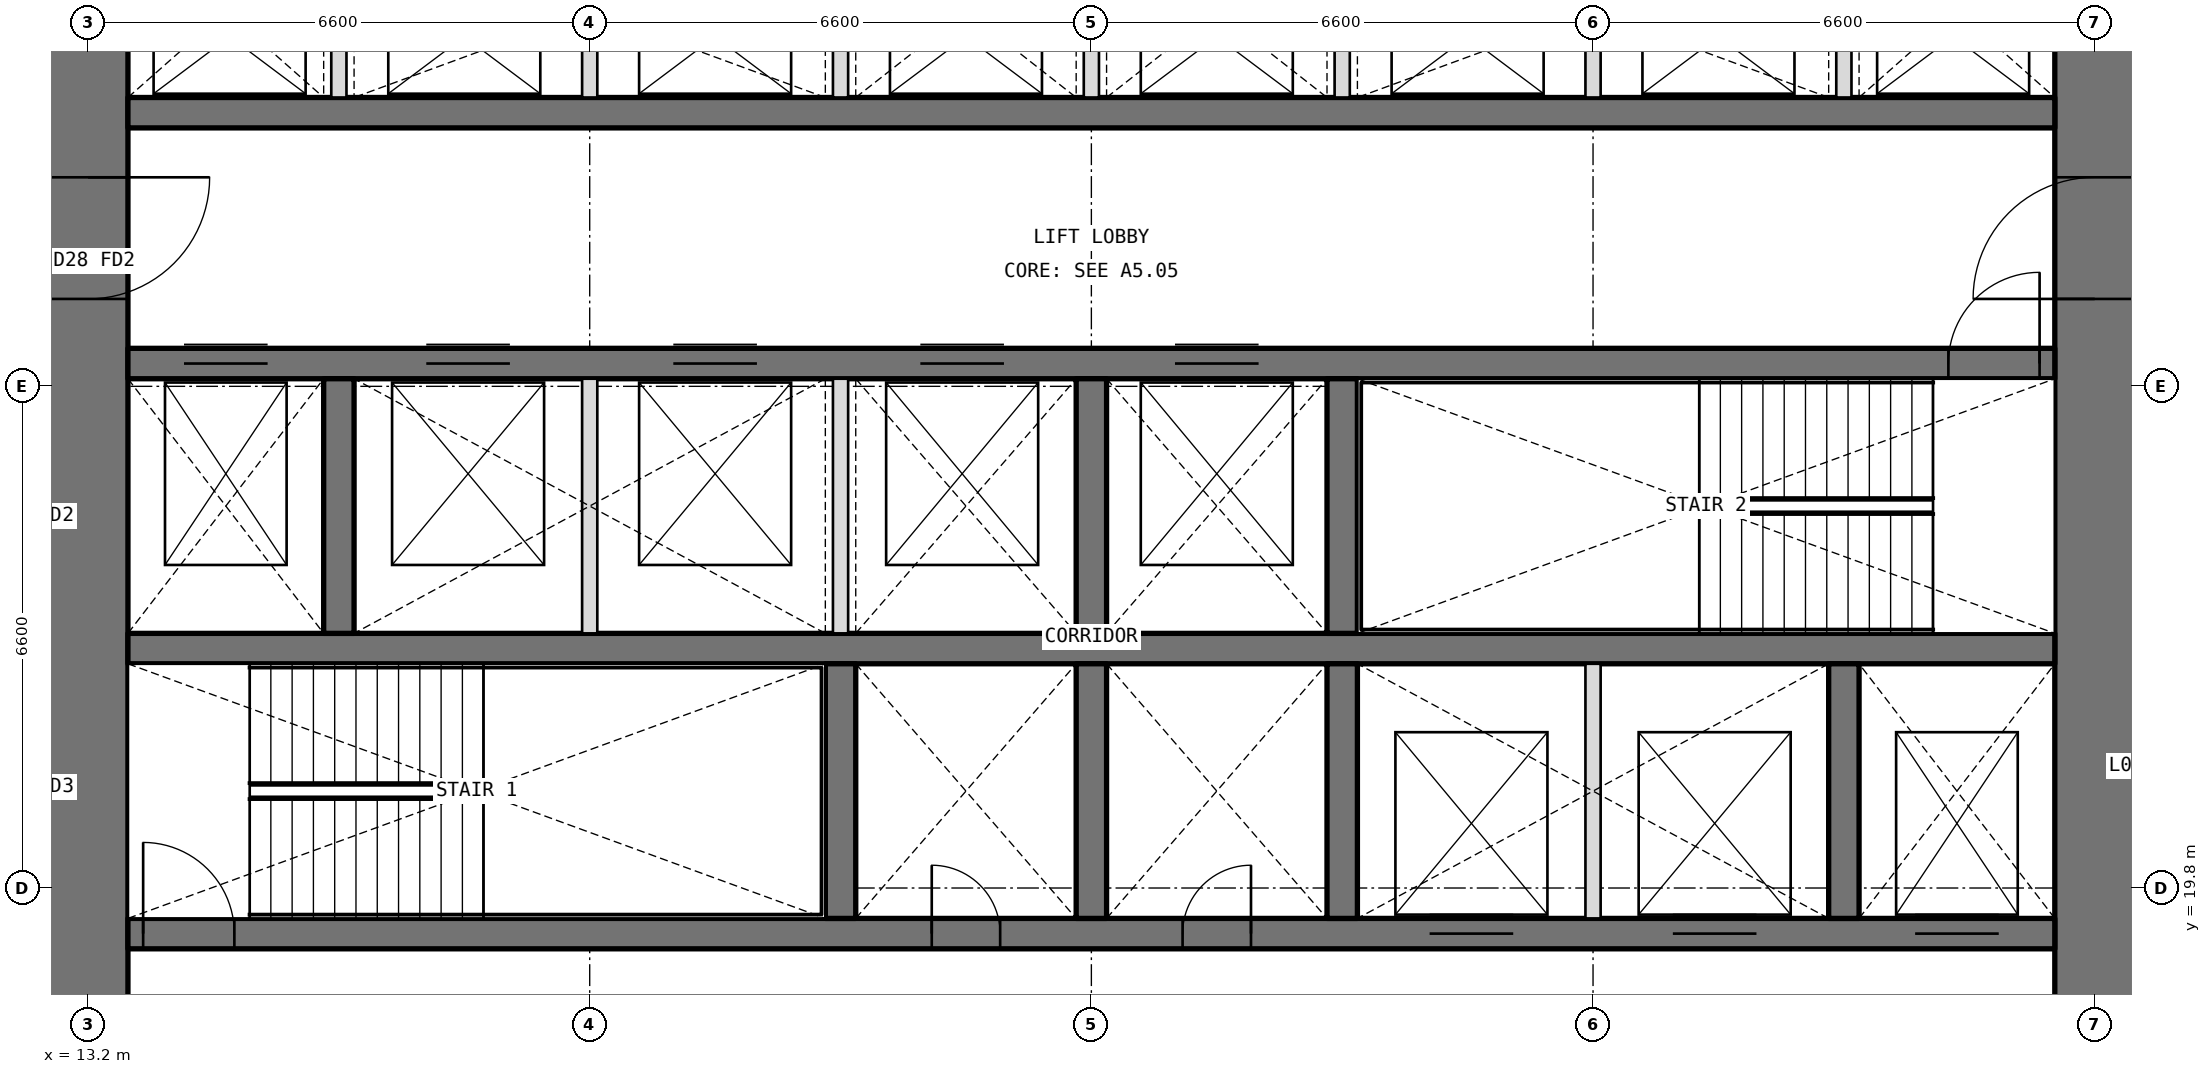
"""IFC4 building model, lengths in metres.
Left out: names, types, materials, properties, quantities, classifications, styles, units other than length and angle.
Written with IfcOpenShell. Run it as: python <this file> out.ifc"""

import sys

from ifc_helpers import new_model, si_unit, direction, frame, frame_2d, origin, place, context, subcontext, project, spatial, rectangle, extrude, element, fill, save


model = new_model("IFC4")
c1 = context("Model", 3, precision=1e-05, world=origin(), true_north=direction((0.0, 1.0)))
c2 = subcontext(c1, "Body", "Model", "MODEL_VIEW")
j1 = project(units=[si_unit("LENGTHUNIT", "METRE"), si_unit("PLANEANGLEUNIT", "RADIAN")], contexts=[c1])
p1 = place(None, origin())
s1 = spatial("IfcSite", under=j1, at=p1, CompositionType="ELEMENT")
p2 = place(p1, origin())
s2 = spatial("IfcBuilding", under=s1, at=p2, CompositionType="ELEMENT")
p3 = place(p2, frame((0.0, 0.0, 17.1)))
s3 = spatial("IfcBuildingStorey", under=s2, at=p3, CompositionType="ELEMENT", Elevation=17.1)
p4 = place(p3, frame((39.6, 13.725, 0.0), z_axis=(0.0, 0.0, 1.0), x_axis=(0.0, 1.0, 0.0)))
e1 = element("IfcWall", 1, at=p4, inside=s3, PredefinedType="SHEAR", context=c2, shape_type="SweptSolid", body=[
    extrude(rectangle(XDim=18.75, YDim=1.05, at=frame_2d((9.375, 0.0))), origin(), (0.0, 0.0, 1.0), 4.2),
])
p5 = place(p4, frame((3.025, 0.0, 0.0)))
e2 = element("IfcOpeningElement", 2, at=p5, cuts=e1, PredefinedType="OPENING", context=c2, shape_type="SweptSolid", body=[
    extrude(rectangle(XDim=1.6, YDim=2.1, at=frame_2d((0.8, 1.05))), frame((0.0, 0.535, 0.0), z_axis=(0.0, -1.0, 0.0), x_axis=(1.0, 0.0, 0.0)), (0.0, 0.0, 1.0), 1.07),
])
p6 = place(p4, frame((13.825, 0.0, 0.0)))
e3 = element("IfcOpeningElement", 3, at=p6, cuts=e1, PredefinedType="OPENING", context=c2, shape_type="SweptSolid", body=[
    extrude(rectangle(XDim=1.6, YDim=2.1, at=frame_2d((0.8, 1.05))), frame((0.0, 0.535, 0.0), z_axis=(0.0, -1.0, 0.0), x_axis=(1.0, 0.0, 0.0)), (0.0, 0.0, 1.0), 1.07),
])
p7 = place(p3, frame((13.2, 32.475, 0.0), z_axis=(0.0, 0.0, 1.0), x_axis=(0.0, -1.0, 0.0)))
e4 = element("IfcWall", 4, at=p7, inside=s3, PredefinedType="SHEAR", context=c2, shape_type="SweptSolid", body=[
    extrude(rectangle(XDim=18.75, YDim=1.05, at=frame_2d((9.375, 0.0))), origin(), (0.0, 0.0, 1.0), 4.2),
])
p8 = place(p7, frame((14.125, 0.0, 0.0)))
e5 = element("IfcOpeningElement", 5, at=p8, cuts=e4, PredefinedType="OPENING", context=c2, shape_type="SweptSolid", body=[
    extrude(rectangle(XDim=1.6, YDim=2.1, at=frame_2d((0.8, 1.05))), frame((0.0, 0.535, 0.0), z_axis=(0.0, -1.0, 0.0), x_axis=(1.0, 0.0, 0.0)), (0.0, 0.0, 1.0), 1.07),
])
p9 = place(p7, frame((3.325, 0.0, 0.0)))
e6 = element("IfcOpeningElement", 6, at=p9, cuts=e4, PredefinedType="OPENING", context=c2, shape_type="SweptSolid", body=[
    extrude(rectangle(XDim=1.6, YDim=2.1, at=frame_2d((0.8, 1.05))), frame((0.0, 0.535, 0.0), z_axis=(0.0, -1.0, 0.0), x_axis=(1.0, 0.0, 0.0)), (0.0, 0.0, 1.0), 1.07),
])
p10 = place(p3, frame((13.725, 19.2, 0.0), z_axis=(0.0, 0.0, 1.0), x_axis=(1.0, 0.0, 0.0)))
e7 = element("IfcWall", 7, at=p10, inside=s3, PredefinedType="SHEAR", context=c2, shape_type="SweptSolid", body=[
    extrude(rectangle(XDim=25.35, YDim=0.4, at=frame_2d((12.675, 0.0))), origin(), (0.0, 0.0, 1.0), 4.2),
])
p11 = place(p10, frame((10.575, 0.0, 0.0)))
e8 = element("IfcOpeningElement", 8, at=p11, cuts=e7, PredefinedType="OPENING", context=c2, shape_type="SweptSolid", body=[
    extrude(rectangle(XDim=0.9, YDim=2.1, at=frame_2d((0.45, 1.05))), frame((0.0, 0.21, 0.0), z_axis=(0.0, -1.0, 0.0), x_axis=(1.0, 0.0, 0.0)), (0.0, 0.0, 1.0), 0.42),
])
p12 = place(p10, frame((13.875, 0.0, 0.0)))
e9 = element("IfcOpeningElement", 9, at=p12, cuts=e7, PredefinedType="OPENING", context=c2, shape_type="SweptSolid", body=[
    extrude(rectangle(XDim=0.9, YDim=2.1, at=frame_2d((0.45, 1.05))), frame((0.0, 0.21, 0.0), z_axis=(0.0, -1.0, 0.0), x_axis=(1.0, 0.0, 0.0)), (0.0, 0.0, 1.0), 0.42),
])
p13 = place(p10, frame((0.2, 0.0, 0.0)))
e10 = element("IfcOpeningElement", 10, at=p13, cuts=e7, PredefinedType="OPENING", context=c2, shape_type="SweptSolid", body=[
    extrude(rectangle(XDim=1.2, YDim=2.1, at=frame_2d((0.6, 1.05))), frame((0.0, 0.21, 0.0), z_axis=(0.0, -1.0, 0.0), x_axis=(1.0, 0.0, 0.0)), (0.0, 0.0, 1.0), 0.42),
])
p14 = place(p10, frame((23.512, 0.0, 0.0)))
e11 = element("IfcOpeningElement", 11, at=p14, cuts=e7, PredefinedType="OPENING", context=c2, shape_type="SweptSolid", body=[
    extrude(rectangle(XDim=1.1, YDim=2.1, at=frame_2d((0.55, 1.05))), frame((0.0, 0.21, 0.0), z_axis=(0.0, -1.0, 0.0), x_axis=(1.0, 0.0, 0.0)), (0.0, 0.0, 1.0), 0.42),
])
p15 = place(p10, frame((17.125, 0.0, 0.0)))
e12 = element("IfcOpeningElement", 12, at=p15, cuts=e7, PredefinedType="OPENING", context=c2, shape_type="SweptSolid", body=[
    extrude(rectangle(XDim=1.1, YDim=2.1, at=frame_2d((0.55, 1.05))), frame((0.0, 0.21, 0.0), z_axis=(0.0, -1.0, 0.0), x_axis=(1.0, 0.0, 0.0)), (0.0, 0.0, 1.0), 0.42),
])
p16 = place(p10, frame((20.325, 0.0, 0.0)))
e13 = element("IfcOpeningElement", 13, at=p16, cuts=e7, PredefinedType="OPENING", context=c2, shape_type="SweptSolid", body=[
    extrude(rectangle(XDim=1.1, YDim=2.1, at=frame_2d((0.55, 1.05))), frame((0.0, 0.21, 0.0), z_axis=(0.0, -1.0, 0.0), x_axis=(1.0, 0.0, 0.0)), (0.0, 0.0, 1.0), 0.42),
])
p17 = place(p3, frame((13.725, 22.95, 0.0), z_axis=(0.0, 0.0, 1.0), x_axis=(1.0, 0.0, 0.0)))
e14 = element("IfcWall", 14, at=p17, inside=s3, PredefinedType="SHEAR", context=c2, shape_type="SweptSolid", body=[
    extrude(rectangle(XDim=25.35, YDim=0.4, at=frame_2d((12.675, 0.0))), origin(), (0.0, 0.0, 1.0), 4.2),
])
p18 = place(p3, frame((13.725, 26.7, 0.0), z_axis=(0.0, 0.0, 1.0), x_axis=(1.0, 0.0, 0.0)))
e15 = element("IfcWall", 15, at=p18, inside=s3, PredefinedType="SHEAR", context=c2, shape_type="SweptSolid", body=[
    extrude(rectangle(XDim=25.35, YDim=0.4, at=frame_2d((12.675, 0.0))), origin(), (0.0, 0.0, 1.0), 4.2),
])
p19 = place(p18, frame((23.95, 0.0, 0.0)))
e16 = element("IfcOpeningElement", 16, at=p19, cuts=e15, PredefinedType="OPENING", context=c2, shape_type="SweptSolid", body=[
    extrude(rectangle(XDim=1.2, YDim=2.1, at=frame_2d((0.6, 1.05))), frame((0.0, 0.21, 0.0), z_axis=(0.0, -1.0, 0.0), x_axis=(1.0, 0.0, 0.0)), (0.0, 0.0, 1.0), 0.42),
])
p20 = place(p18, frame((0.738, 0.0, 0.0)))
e17 = element("IfcOpeningElement", 17, at=p20, cuts=e15, PredefinedType="OPENING", context=c2, shape_type="SweptSolid", body=[
    extrude(rectangle(XDim=1.1, YDim=2.1, at=frame_2d((0.55, 1.05))), frame((0.0, 0.21, 0.0), z_axis=(0.0, -1.0, 0.0), x_axis=(1.0, 0.0, 0.0)), (0.0, 0.0, 1.0), 0.42),
])
p21 = place(p18, frame((3.925, 0.0, 0.0)))
e18 = element("IfcOpeningElement", 18, at=p21, cuts=e15, PredefinedType="OPENING", context=c2, shape_type="SweptSolid", body=[
    extrude(rectangle(XDim=1.1, YDim=2.1, at=frame_2d((0.55, 1.05))), frame((0.0, 0.21, 0.0), z_axis=(0.0, -1.0, 0.0), x_axis=(1.0, 0.0, 0.0)), (0.0, 0.0, 1.0), 0.42),
])
p22 = place(p18, frame((7.175, 0.0, 0.0)))
e19 = element("IfcOpeningElement", 19, at=p22, cuts=e15, PredefinedType="OPENING", context=c2, shape_type="SweptSolid", body=[
    extrude(rectangle(XDim=1.1, YDim=2.1, at=frame_2d((0.55, 1.05))), frame((0.0, 0.21, 0.0), z_axis=(0.0, -1.0, 0.0), x_axis=(1.0, 0.0, 0.0)), (0.0, 0.0, 1.0), 0.42),
])
p23 = place(p18, frame((10.425, 0.0, 0.0)))
e20 = element("IfcOpeningElement", 20, at=p23, cuts=e15, PredefinedType="OPENING", context=c2, shape_type="SweptSolid", body=[
    extrude(rectangle(XDim=1.1, YDim=2.1, at=frame_2d((0.55, 1.05))), frame((0.0, 0.21, 0.0), z_axis=(0.0, -1.0, 0.0), x_axis=(1.0, 0.0, 0.0)), (0.0, 0.0, 1.0), 0.42),
])
p24 = place(p18, frame((13.775, 0.0, 0.0)))
e21 = element("IfcOpeningElement", 21, at=p24, cuts=e15, PredefinedType="OPENING", context=c2, shape_type="SweptSolid", body=[
    extrude(rectangle(XDim=1.1, YDim=2.1, at=frame_2d((0.55, 1.05))), frame((0.0, 0.21, 0.0), z_axis=(0.0, -1.0, 0.0), x_axis=(1.0, 0.0, 0.0)), (0.0, 0.0, 1.0), 0.42),
])
p25 = place(p3, frame((13.725, 30.0, 0.0), z_axis=(0.0, 0.0, 1.0), x_axis=(1.0, 0.0, 0.0)))
e22 = element("IfcWall", 22, at=p25, inside=s3, PredefinedType="SHEAR", context=c2, shape_type="SweptSolid", body=[
    extrude(rectangle(XDim=25.35, YDim=0.4, at=frame_2d((12.675, 0.0))), origin(), (0.0, 0.0, 1.0), 4.2),
])
for number, where, z_axis, x_axis in (
    (23, (23.1, 19.4, 0.0), (0.0, 0.0, 1.0), (0.0, 1.0, 0.0)),
    (24, (26.4, 19.4, 0.0), (0.0, 0.0, 1.0), (0.0, 1.0, 0.0)),
    (25, (29.7, 19.4, 0.0), (0.0, 0.0, 1.0), (0.0, 1.0, 0.0)),
    (26, (36.3, 19.4, 0.0), (0.0, 0.0, 1.0), (0.0, 1.0, 0.0)),
    (27, (16.5, 23.15, 0.0), (0.0, 0.0, 1.0), (0.0, 1.0, 0.0)),
    (28, (26.4, 23.15, 0.0), (0.0, 0.0, 1.0), (0.0, 1.0, 0.0)),
    (29, (29.7, 23.15, 0.0), (0.0, 0.0, 1.0), (0.0, 1.0, 0.0)),
):
    element("IfcWall", number, at=place(p3, frame(where, z_axis=z_axis, x_axis=x_axis)), inside=s3, PredefinedType="SHEAR", context=c2, shape_type="SweptSolid", body=[
        extrude(rectangle(XDim=3.35, YDim=0.4, at=frame_2d((1.675, 0.0))), origin(), (0.0, 0.0, 1.0), 4.2),
    ])
for number, where, z_axis, x_axis in (
    (30, (16.5, 30.2, 0.0), (0.0, 0.0, 1.0), (0.0, 1.0, 0.0)),
    (31, (19.8, 30.2, 0.0), (0.0, 0.0, 1.0), (0.0, 1.0, 0.0)),
    (32, (23.1, 30.2, 0.0), (0.0, 0.0, 1.0), (0.0, 1.0, 0.0)),
    (33, (26.4, 30.2, 0.0), (0.0, 0.0, 1.0), (0.0, 1.0, 0.0)),
    (34, (29.7, 30.2, 0.0), (0.0, 0.0, 1.0), (0.0, 1.0, 0.0)),
    (35, (33.0, 30.2, 0.0), (0.0, 0.0, 1.0), (0.0, 1.0, 0.0)),
    (36, (36.3, 30.2, 0.0), (0.0, 0.0, 1.0), (0.0, 1.0, 0.0)),
):
    element("IfcWall", number, at=place(p3, frame(where, z_axis=z_axis, x_axis=x_axis)), inside=s3, PredefinedType="PARTITIONING", context=c2, shape_type="SweptSolid", body=[
        extrude(rectangle(XDim=2.275, YDim=0.2, at=frame_2d((1.138, 0.0))), origin(), (0.0, 0.0, 1.0), 4.2),
    ])
for number, where, z_axis, x_axis in (
    (37, (33.0, 19.4, 0.0), (0.0, 0.0, 1.0), (0.0, 1.0, 0.0)),
    (38, (19.8, 23.15, 0.0), (0.0, 0.0, 1.0), (0.0, 1.0, 0.0)),
    (39, (23.1, 23.15, 0.0), (0.0, 0.0, 1.0), (0.0, 1.0, 0.0)),
):
    element("IfcWall", number, at=place(p3, frame(where, z_axis=z_axis, x_axis=x_axis)), inside=s3, PredefinedType="PARTITIONING", context=c2, shape_type="SweptSolid", body=[
        extrude(rectangle(XDim=3.35, YDim=0.2, at=frame_2d((1.675, 0.0))), origin(), (0.0, 0.0, 1.0), 4.2),
    ])
p26 = place(p11, origin())
e40 = element("IfcDoor", 40, at=p26, inside=s3, OperationType="SINGLE_SWING_LEFT", PredefinedType="DOOR", context=c2, shape_type="SweptSolid", body=[
    extrude(rectangle(XDim=0.9, YDim=2.1, at=frame_2d((0.45, 1.05))), frame((0.0, 0.025, 0.0), z_axis=(0.0, -1.0, 0.0), x_axis=(1.0, 0.0, 0.0)), (0.0, 0.0, 1.0), 0.05),
])
fill(e8, e40)
p27 = place(p12, origin())
e41 = element("IfcDoor", 41, at=p27, inside=s3, OperationType="SINGLE_SWING_RIGHT", PredefinedType="DOOR", context=c2, shape_type="SweptSolid", body=[
    extrude(rectangle(XDim=0.9, YDim=2.1, at=frame_2d((0.45, 1.05))), frame((0.0, 0.025, 0.0), z_axis=(0.0, -1.0, 0.0), x_axis=(1.0, 0.0, 0.0)), (0.0, 0.0, 1.0), 0.05),
])
fill(e9, e41)
p28 = place(p13, origin())
e42 = element("IfcDoor", 42, at=p28, inside=s3, OperationType="SINGLE_SWING_LEFT", PredefinedType="DOOR", context=c2, shape_type="SweptSolid", body=[
    extrude(rectangle(XDim=1.2, YDim=2.1, at=frame_2d((0.6, 1.05))), frame((0.0, 0.025, 0.0), z_axis=(0.0, -1.0, 0.0), x_axis=(1.0, 0.0, 0.0)), (0.0, 0.0, 1.0), 0.05),
])
fill(e10, e42)
p29 = place(p19, origin())
e43 = element("IfcDoor", 43, at=p29, inside=s3, OperationType="SINGLE_SWING_RIGHT", PredefinedType="DOOR", context=c2, shape_type="SweptSolid", body=[
    extrude(rectangle(XDim=1.2, YDim=2.1, at=frame_2d((0.6, 1.05))), frame((0.0, 0.025, 0.0), z_axis=(0.0, -1.0, 0.0), x_axis=(1.0, 0.0, 0.0)), (0.0, 0.0, 1.0), 0.05),
])
fill(e16, e43)
p30 = place(p9, origin())
e44 = element("IfcDoor", 44, at=p30, inside=s3, OperationType="DOUBLE_DOOR_DOUBLE_SWING", PredefinedType="DOOR", context=c2, shape_type="SweptSolid", body=[
    extrude(rectangle(XDim=1.6, YDim=2.1, at=frame_2d((0.8, 1.05))), frame((0.0, 0.025, 0.0), z_axis=(0.0, -1.0, 0.0), x_axis=(1.0, 0.0, 0.0)), (0.0, 0.0, 1.0), 0.05),
])
fill(e6, e44)
p31 = place(p6, origin())
e45 = element("IfcDoor", 45, at=p31, inside=s3, OperationType="DOUBLE_DOOR_DOUBLE_SWING", PredefinedType="DOOR", context=c2, shape_type="SweptSolid", body=[
    extrude(rectangle(XDim=1.6, YDim=2.1, at=frame_2d((0.8, 1.05))), frame((0.0, 0.025, 0.0), z_axis=(0.0, -1.0, 0.0), x_axis=(1.0, 0.0, 0.0)), (0.0, 0.0, 1.0), 0.05),
])
fill(e3, e45)
p32 = place(p20, origin())
e46 = element("IfcDoor", 46, at=p32, inside=s3, OperationType="DOUBLE_DOOR_SLIDING", PredefinedType="DOOR", context=c2, shape_type="SweptSolid", body=[
    extrude(rectangle(XDim=1.1, YDim=2.1, at=frame_2d((0.55, 1.05))), frame((0.0, 0.025, 0.0), z_axis=(0.0, -1.0, 0.0), x_axis=(1.0, 0.0, 0.0)), (0.0, 0.0, 1.0), 0.05),
])
fill(e17, e46)
p33 = place(p14, origin())
e47 = element("IfcDoor", 47, at=p33, inside=s3, OperationType="DOUBLE_DOOR_SLIDING", PredefinedType="DOOR", context=c2, shape_type="SweptSolid", body=[
    extrude(rectangle(XDim=1.1, YDim=2.1, at=frame_2d((0.55, 1.05))), frame((0.0, 0.025, 0.0), z_axis=(0.0, -1.0, 0.0), x_axis=(1.0, 0.0, 0.0)), (0.0, 0.0, 1.0), 0.05),
])
fill(e11, e47)
p34 = place(p15, origin())
e48 = element("IfcDoor", 48, at=p34, inside=s3, OperationType="DOUBLE_DOOR_SLIDING", PredefinedType="DOOR", context=c2, shape_type="SweptSolid", body=[
    extrude(rectangle(XDim=1.1, YDim=2.1, at=frame_2d((0.55, 1.05))), frame((0.0, 0.025, 0.0), z_axis=(0.0, -1.0, 0.0), x_axis=(1.0, 0.0, 0.0)), (0.0, 0.0, 1.0), 0.05),
])
fill(e12, e48)
p35 = place(p16, origin())
e49 = element("IfcDoor", 49, at=p35, inside=s3, OperationType="DOUBLE_DOOR_SLIDING", PredefinedType="DOOR", context=c2, shape_type="SweptSolid", body=[
    extrude(rectangle(XDim=1.1, YDim=2.1, at=frame_2d((0.55, 1.05))), frame((0.0, 0.025, 0.0), z_axis=(0.0, -1.0, 0.0), x_axis=(1.0, 0.0, 0.0)), (0.0, 0.0, 1.0), 0.05),
])
fill(e13, e49)
p36 = place(p21, origin())
e50 = element("IfcDoor", 50, at=p36, inside=s3, OperationType="DOUBLE_DOOR_SLIDING", PredefinedType="DOOR", context=c2, shape_type="SweptSolid", body=[
    extrude(rectangle(XDim=1.1, YDim=2.1, at=frame_2d((0.55, 1.05))), frame((0.0, 0.025, 0.0), z_axis=(0.0, -1.0, 0.0), x_axis=(1.0, 0.0, 0.0)), (0.0, 0.0, 1.0), 0.05),
])
fill(e18, e50)
p37 = place(p22, origin())
e51 = element("IfcDoor", 51, at=p37, inside=s3, OperationType="DOUBLE_DOOR_SLIDING", PredefinedType="DOOR", context=c2, shape_type="SweptSolid", body=[
    extrude(rectangle(XDim=1.1, YDim=2.1, at=frame_2d((0.55, 1.05))), frame((0.0, 0.025, 0.0), z_axis=(0.0, -1.0, 0.0), x_axis=(1.0, 0.0, 0.0)), (0.0, 0.0, 1.0), 0.05),
])
fill(e19, e51)
p38 = place(p23, origin())
e52 = element("IfcDoor", 52, at=p38, inside=s3, OperationType="DOUBLE_DOOR_SLIDING", PredefinedType="DOOR", context=c2, shape_type="SweptSolid", body=[
    extrude(rectangle(XDim=1.1, YDim=2.1, at=frame_2d((0.55, 1.05))), frame((0.0, 0.025, 0.0), z_axis=(0.0, -1.0, 0.0), x_axis=(1.0, 0.0, 0.0)), (0.0, 0.0, 1.0), 0.05),
])
fill(e20, e52)
p39 = place(p24, origin())
e53 = element("IfcDoor", 53, at=p39, inside=s3, OperationType="DOUBLE_DOOR_SLIDING", PredefinedType="DOOR", context=c2, shape_type="SweptSolid", body=[
    extrude(rectangle(XDim=1.1, YDim=2.1, at=frame_2d((0.55, 1.05))), frame((0.0, 0.025, 0.0), z_axis=(0.0, -1.0, 0.0), x_axis=(1.0, 0.0, 0.0)), (0.0, 0.0, 1.0), 0.05),
])
fill(e21, e53)
save(model, sys.argv[1])
